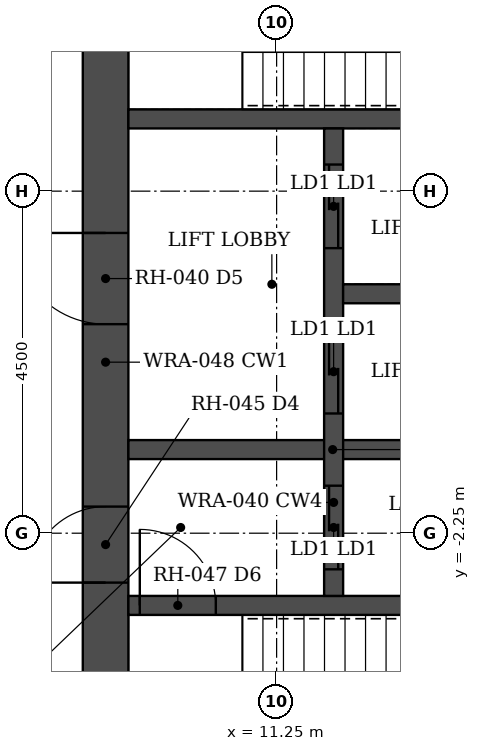
"""IFC4 building model, lengths in metres.
Left out: names, types, materials, properties, quantities, classifications, styles, units other than length and angle.
Written with IfcOpenShell. Run it as: python <this file> out.ifc"""

import sys

from ifc_helpers import new_model, si_unit, direction, frame, frame_2d, origin, place, context, subcontext, project, spatial, rectangle, extrude, element, fill, save


model = new_model("IFC4")
c1 = context("Model", 3, precision=1e-05, world=origin(), true_north=direction((0.0, 1.0)))
c2 = subcontext(c1, "Body", "Model", "MODEL_VIEW")
j1 = project(units=[si_unit("LENGTHUNIT", "METRE"), si_unit("PLANEANGLEUNIT", "RADIAN")], contexts=[c1])
p1 = place(None, origin())
s1 = spatial("IfcSite", under=j1, at=p1, CompositionType="ELEMENT")
p2 = place(p1, origin())
s2 = spatial("IfcBuilding", under=s1, at=p2, CompositionType="ELEMENT")
p3 = place(p2, frame((0.0, 0.0, 103.5)))
s3 = spatial("IfcBuildingStorey", under=s2, at=p3, CompositionType="ELEMENT", Elevation=103.5)
p4 = place(p3, frame((9.0, -6.45, 0.0), z_axis=(0.0, 0.0, 1.0), x_axis=(0.0, 1.0, 0.0)))
e1 = element("IfcWall", 1, at=p4, inside=s3, PredefinedType="SHEAR", context=c2, shape_type="SweptSolid", body=[
    extrude(rectangle(XDim=12.9, YDim=0.6, at=frame_2d((6.45, 0.0))), origin(), (0.0, 0.0, 1.0), 3.5),
])
p5 = place(p4, frame((3.55, 0.0, 0.0)))
e2 = element("IfcOpeningElement", 2, at=p5, cuts=e1, PredefinedType="OPENING", context=c2, shape_type="SweptSolid", body=[
    extrude(rectangle(XDim=1.0, YDim=2.1, at=frame_2d((0.5, 1.05))), frame((0.0, 0.31, 0.0), z_axis=(0.0, -1.0, 0.0), x_axis=(1.0, 0.0, 0.0)), (0.0, 0.0, 1.0), 0.62),
])
p6 = place(p4, frame((6.95, 0.0, 0.0)))
e3 = element("IfcOpeningElement", 3, at=p6, cuts=e1, PredefinedType="OPENING", context=c2, shape_type="SweptSolid", body=[
    extrude(rectangle(XDim=1.2, YDim=2.1, at=frame_2d((0.6, 1.05))), frame((0.0, 0.31, 0.0), z_axis=(0.0, -1.0, 0.0), x_axis=(1.0, 0.0, 0.0)), (0.0, 0.0, 1.0), 0.62),
])
p7 = place(p4, frame((10.85, 0.0, 0.0)))
e4 = element("IfcOpeningElement", 4, at=p7, cuts=e1, PredefinedType="OPENING", context=c2, shape_type="SweptSolid", body=[
    extrude(rectangle(XDim=1.0, YDim=2.1, at=frame_2d((0.5, 1.05))), frame((0.0, 0.31, 0.0), z_axis=(0.0, -1.0, 0.0), x_axis=(1.0, 0.0, 0.0)), (0.0, 0.0, 1.0), 0.62),
])
p8 = place(p3, frame((9.3, -3.2, 0.0), z_axis=(0.0, 0.0, 1.0), x_axis=(1.0, 0.0, 0.0)))
e5 = element("IfcWall", 5, at=p8, inside=s3, PredefinedType="SHEAR", context=c2, shape_type="SweptSolid", body=[
    extrude(rectangle(XDim=8.4, YDim=0.25, at=frame_2d((4.2, 0.0))), origin(), (0.0, 0.0, 1.0), 3.5),
])
p9 = place(p8, frame((0.15, 0.0, 0.0)))
e6 = element("IfcOpeningElement", 6, at=p9, cuts=e5, PredefinedType="OPENING", context=c2, shape_type="SweptSolid", body=[
    extrude(rectangle(XDim=1.0, YDim=2.1, at=frame_2d((0.5, 1.05))), frame((0.0, 0.135, 0.0), z_axis=(0.0, -1.0, 0.0), x_axis=(1.0, 0.0, 0.0)), (0.0, 0.0, 1.0), 0.27),
])
p10 = place(p3, frame((9.3, 3.2, 0.0), z_axis=(0.0, 0.0, 1.0), x_axis=(1.0, 0.0, 0.0)))
e7 = element("IfcWall", 7, at=p10, inside=s3, PredefinedType="SHEAR", context=c2, shape_type="SweptSolid", body=[
    extrude(rectangle(XDim=8.4, YDim=0.25, at=frame_2d((4.2, 0.0))), origin(), (0.0, 0.0, 1.0), 3.5),
])
p11 = place(p3, frame((9.3, -1.15, 0.0), z_axis=(0.0, 0.0, 1.0), x_axis=(1.0, 0.0, 0.0)))
e8 = element("IfcWall", 8, at=p11, inside=s3, PredefinedType="SHEAR", context=c2, shape_type="SweptSolid", body=[
    extrude(rectangle(XDim=5.375, YDim=0.25, at=frame_2d((2.688, 0.0))), origin(), (0.0, 0.0, 1.0), 3.5),
])
p12 = place(p3, frame((12.0, -3.075, 0.0), z_axis=(0.0, 0.0, 1.0), x_axis=(0.0, 1.0, 0.0)))
e9 = element("IfcWall", 9, at=p12, inside=s3, PredefinedType="SHEAR", context=c2, shape_type="SweptSolid", body=[
    extrude(rectangle(XDim=6.15, YDim=0.25, at=frame_2d((3.075, 0.0))), origin(), (0.0, 0.0, 1.0), 3.5),
])
p13 = place(p12, frame((0.35, 0.0, 0.0)))
e10 = element("IfcOpeningElement", 10, at=p13, cuts=e9, PredefinedType="OPENING", context=c2, shape_type="SweptSolid", body=[
    extrude(rectangle(XDim=1.1, YDim=2.1, at=frame_2d((0.55, 1.05))), frame((0.0, 0.135, 0.0), z_axis=(0.0, -1.0, 0.0), x_axis=(1.0, 0.0, 0.0)), (0.0, 0.0, 1.0), 0.27),
])
p14 = place(p12, frame((2.4, 0.0, 0.0)))
e11 = element("IfcOpeningElement", 11, at=p14, cuts=e9, PredefinedType="OPENING", context=c2, shape_type="SweptSolid", body=[
    extrude(rectangle(XDim=1.1, YDim=2.1, at=frame_2d((0.55, 1.05))), frame((0.0, 0.135, 0.0), z_axis=(0.0, -1.0, 0.0), x_axis=(1.0, 0.0, 0.0)), (0.0, 0.0, 1.0), 0.27),
])
p15 = place(p12, frame((4.575, 0.0, 0.0)))
e12 = element("IfcOpeningElement", 12, at=p15, cuts=e9, PredefinedType="OPENING", context=c2, shape_type="SweptSolid", body=[
    extrude(rectangle(XDim=1.1, YDim=2.1, at=frame_2d((0.55, 1.05))), frame((0.0, 0.135, 0.0), z_axis=(0.0, -1.0, 0.0), x_axis=(1.0, 0.0, 0.0)), (0.0, 0.0, 1.0), 0.27),
])
p16 = place(p3, frame((12.125, 0.9, 0.0), z_axis=(0.0, 0.0, 1.0), x_axis=(1.0, 0.0, 0.0)))
e13 = element("IfcWall", 13, at=p16, inside=s3, PredefinedType="SHEAR", context=c2, shape_type="SweptSolid", body=[
    extrude(rectangle(XDim=2.55, YDim=0.25, at=frame_2d((1.275, 0.0))), origin(), (0.0, 0.0, 1.0), 3.5),
])
p17 = place(p5, origin())
e14 = element("IfcDoor", 14, at=p17, inside=s3, OperationType="SINGLE_SWING_LEFT", PredefinedType="DOOR", context=c2, shape_type="SweptSolid", body=[
    extrude(rectangle(XDim=1.0, YDim=2.1, at=frame_2d((0.5, 1.05))), frame((0.0, 0.025, 0.0), z_axis=(0.0, -1.0, 0.0), x_axis=(1.0, 0.0, 0.0)), (0.0, 0.0, 1.0), 0.05),
])
fill(e2, e14)
p18 = place(p9, origin())
e15 = element("IfcDoor", 15, at=p18, inside=s3, OperationType="SINGLE_SWING_LEFT", PredefinedType="DOOR", context=c2, shape_type="SweptSolid", body=[
    extrude(rectangle(XDim=1.0, YDim=2.1, at=frame_2d((0.5, 1.05))), frame((0.0, 0.025, 0.0), z_axis=(0.0, -1.0, 0.0), x_axis=(1.0, 0.0, 0.0)), (0.0, 0.0, 1.0), 0.05),
])
fill(e6, e15)
p19 = place(p6, origin())
e16 = element("IfcDoor", 16, at=p19, inside=s3, OperationType="SINGLE_SWING_RIGHT", PredefinedType="DOOR", context=c2, shape_type="SweptSolid", body=[
    extrude(rectangle(XDim=1.2, YDim=2.1, at=frame_2d((0.6, 1.05))), frame((0.0, 0.025, 0.0), z_axis=(0.0, -1.0, 0.0), x_axis=(1.0, 0.0, 0.0)), (0.0, 0.0, 1.0), 0.05),
])
fill(e3, e16)
p20 = place(p13, origin())
e17 = element("IfcDoor", 17, at=p20, inside=s3, OperationType="DOUBLE_DOOR_SLIDING", PredefinedType="DOOR", context=c2, shape_type="SweptSolid", body=[
    extrude(rectangle(XDim=1.1, YDim=2.1, at=frame_2d((0.55, 1.05))), frame((0.0, 0.025, 0.0), z_axis=(0.0, -1.0, 0.0), x_axis=(1.0, 0.0, 0.0)), (0.0, 0.0, 1.0), 0.05),
])
fill(e10, e17)
p21 = place(p14, origin())
e18 = element("IfcDoor", 18, at=p21, inside=s3, OperationType="DOUBLE_DOOR_SLIDING", PredefinedType="DOOR", context=c2, shape_type="SweptSolid", body=[
    extrude(rectangle(XDim=1.1, YDim=2.1, at=frame_2d((0.55, 1.05))), frame((0.0, 0.025, 0.0), z_axis=(0.0, -1.0, 0.0), x_axis=(1.0, 0.0, 0.0)), (0.0, 0.0, 1.0), 0.05),
])
fill(e11, e18)
p22 = place(p15, origin())
e19 = element("IfcDoor", 19, at=p22, inside=s3, OperationType="DOUBLE_DOOR_SLIDING", PredefinedType="DOOR", context=c2, shape_type="SweptSolid", body=[
    extrude(rectangle(XDim=1.1, YDim=2.1, at=frame_2d((0.55, 1.05))), frame((0.0, 0.025, 0.0), z_axis=(0.0, -1.0, 0.0), x_axis=(1.0, 0.0, 0.0)), (0.0, 0.0, 1.0), 0.05),
])
fill(e12, e19)
save(model, sys.argv[1])
